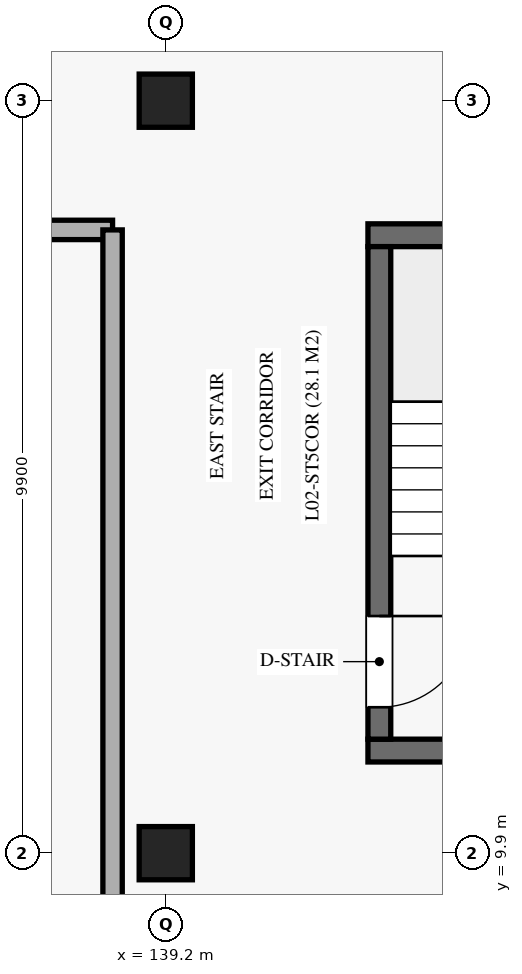
"""IFC4 building model, lengths in metres.
Left out: names, types, materials, properties, quantities, classifications, styles, units other than length and angle.
Written with IfcOpenShell. Run it as: python <this file> out.ifc"""

import sys

from ifc_helpers import new_model, si_unit, direction, frame, frame_2d, origin, origin_2d, place, context, subcontext, project, spatial, rectangle, extrude, element, fill, save


model = new_model("IFC4")
c1 = context("Model", 3, precision=1e-05, world=origin(), true_north=direction((0.0, 1.0)))
c2 = subcontext(c1, "Body", "Model", "MODEL_VIEW")
j1 = project(units=[si_unit("LENGTHUNIT", "METRE"), si_unit("PLANEANGLEUNIT", "RADIAN")], contexts=[c1])
p1 = place(None, origin())
s1 = spatial("IfcSite", under=j1, at=p1, CompositionType="ELEMENT")
p2 = place(p1, origin())
s2 = spatial("IfcBuilding", under=s1, at=p2, CompositionType="ELEMENT")
p3 = place(p2, frame((0.0, 0.0, 10.88)))
s3 = spatial("IfcBuildingStorey", under=s2, at=p3, CompositionType="ELEMENT", Elevation=10.88)
for number, where, z_axis, x_axis in (
    (1, (139.2, 9.9, 0.0), (0.0, 0.0, 1.0), (1.0, 0.0, 0.0)),
    (2, (139.2, 19.8, 0.0), (0.0, 0.0, 1.0), (1.0, 0.0, 0.0)),
):
    element("IfcColumn", number, at=place(p3, frame(where, z_axis=z_axis, x_axis=x_axis)), inside=s3, PredefinedType="COLUMN", context=c2, shape_type="SweptSolid", body=[
        extrude(rectangle(XDim=0.7, YDim=0.7, at=origin_2d()), origin(), (0.0, 0.0, 1.0), 5.44),
    ])
for number, where, z_axis, x_axis in (
    (3, (141.86, 11.25, 0.0), (0.0, 0.0, 1.0), (1.0, 0.0, 0.0)),
    (4, (141.86, 18.03, 0.0), (0.0, 0.0, 1.0), (1.0, 0.0, 0.0)),
):
    element("IfcWall", number, at=place(p3, frame(where, z_axis=z_axis, x_axis=x_axis)), inside=s3, PredefinedType="SHEAR", context=c2, shape_type="SweptSolid", body=[
        extrude(rectangle(XDim=7.08, YDim=0.3, at=frame_2d((3.54, 0.0))), origin(), (0.0, 0.0, 1.0), 5.16),
    ])
p4 = place(p3, frame((142.01, 11.4, 0.0), z_axis=(0.0, 0.0, 1.0), x_axis=(0.0, 1.0, 0.0)))
e5 = element("IfcWall", 5, at=p4, inside=s3, PredefinedType="SHEAR", context=c2, shape_type="SweptSolid", body=[
    extrude(rectangle(XDim=6.48, YDim=0.3, at=frame_2d((3.24, 0.0))), origin(), (0.0, 0.0, 1.0), 5.16),
])
p5 = place(p4, frame((0.42, 0.0, 0.0)))
e6 = element("IfcOpeningElement", 6, at=p5, cuts=e5, PredefinedType="OPENING", context=c2, shape_type="SweptSolid", body=[
    extrude(rectangle(XDim=1.2, YDim=2.2, at=frame_2d((0.6, 1.1))), frame((0.0, 0.16, 0.0), z_axis=(0.0, -1.0, 0.0), x_axis=(1.0, 0.0, 0.0)), (0.0, 0.0, 1.0), 0.32),
])
p6 = place(p3, frame((92.4, 18.1, 0.0), z_axis=(0.0, 0.0, 1.0), x_axis=(1.0, 0.0, 0.0)))
e7 = element("IfcWall", 7, at=p6, inside=s3, PredefinedType="SOLIDWALL", context=c2, shape_type="SweptSolid", body=[
    extrude(rectangle(XDim=46.1, YDim=0.255, at=frame_2d((23.05, 0.0))), origin(), (0.0, 0.0, 1.0), 4.28),
])
p7 = place(p6, frame((36.0, 0.0, 0.0)))
e8 = element("IfcOpeningElement", 8, at=p7, cuts=e7, PredefinedType="OPENING", context=c2, shape_type="SweptSolid", body=[
    extrude(rectangle(XDim=1.8, YDim=2.35, at=frame_2d((0.9, 1.175))), frame((0.0, 0.137, 0.0), z_axis=(0.0, -1.0, 0.0), x_axis=(1.0, 0.0, 0.0)), (0.0, 0.0, 1.0), 0.275),
])
p8 = place(p3, frame((138.5, 0.4, 0.0), z_axis=(0.0, 0.0, 1.0), x_axis=(0.0, 1.0, 0.0)))
e9 = element("IfcWall", 9, at=p8, inside=s3, PredefinedType="SOLIDWALL", context=c2, shape_type="SweptSolid", body=[
    extrude(rectangle(XDim=17.7, YDim=0.255, at=frame_2d((8.85, 0.0))), origin(), (0.0, 0.0, 1.0), 4.28),
])
p9 = place(p5, frame((1.2, 0.0, 0.0), z_axis=(0.0, 0.0, 1.0), x_axis=(-1.0, 0.0, 0.0)))
e10 = element("IfcDoor", 10, at=p9, inside=s3, OperationType="SINGLE_SWING_LEFT", PredefinedType="DOOR", context=c2, shape_type="SweptSolid", body=[
    extrude(rectangle(XDim=1.2, YDim=2.2, at=frame_2d((0.6, 1.1))), frame((0.0, 0.025, 0.0), z_axis=(0.0, -1.0, 0.0), x_axis=(1.0, 0.0, 0.0)), (0.0, 0.0, 1.0), 0.05),
])
fill(e6, e10)
save(model, sys.argv[1])
